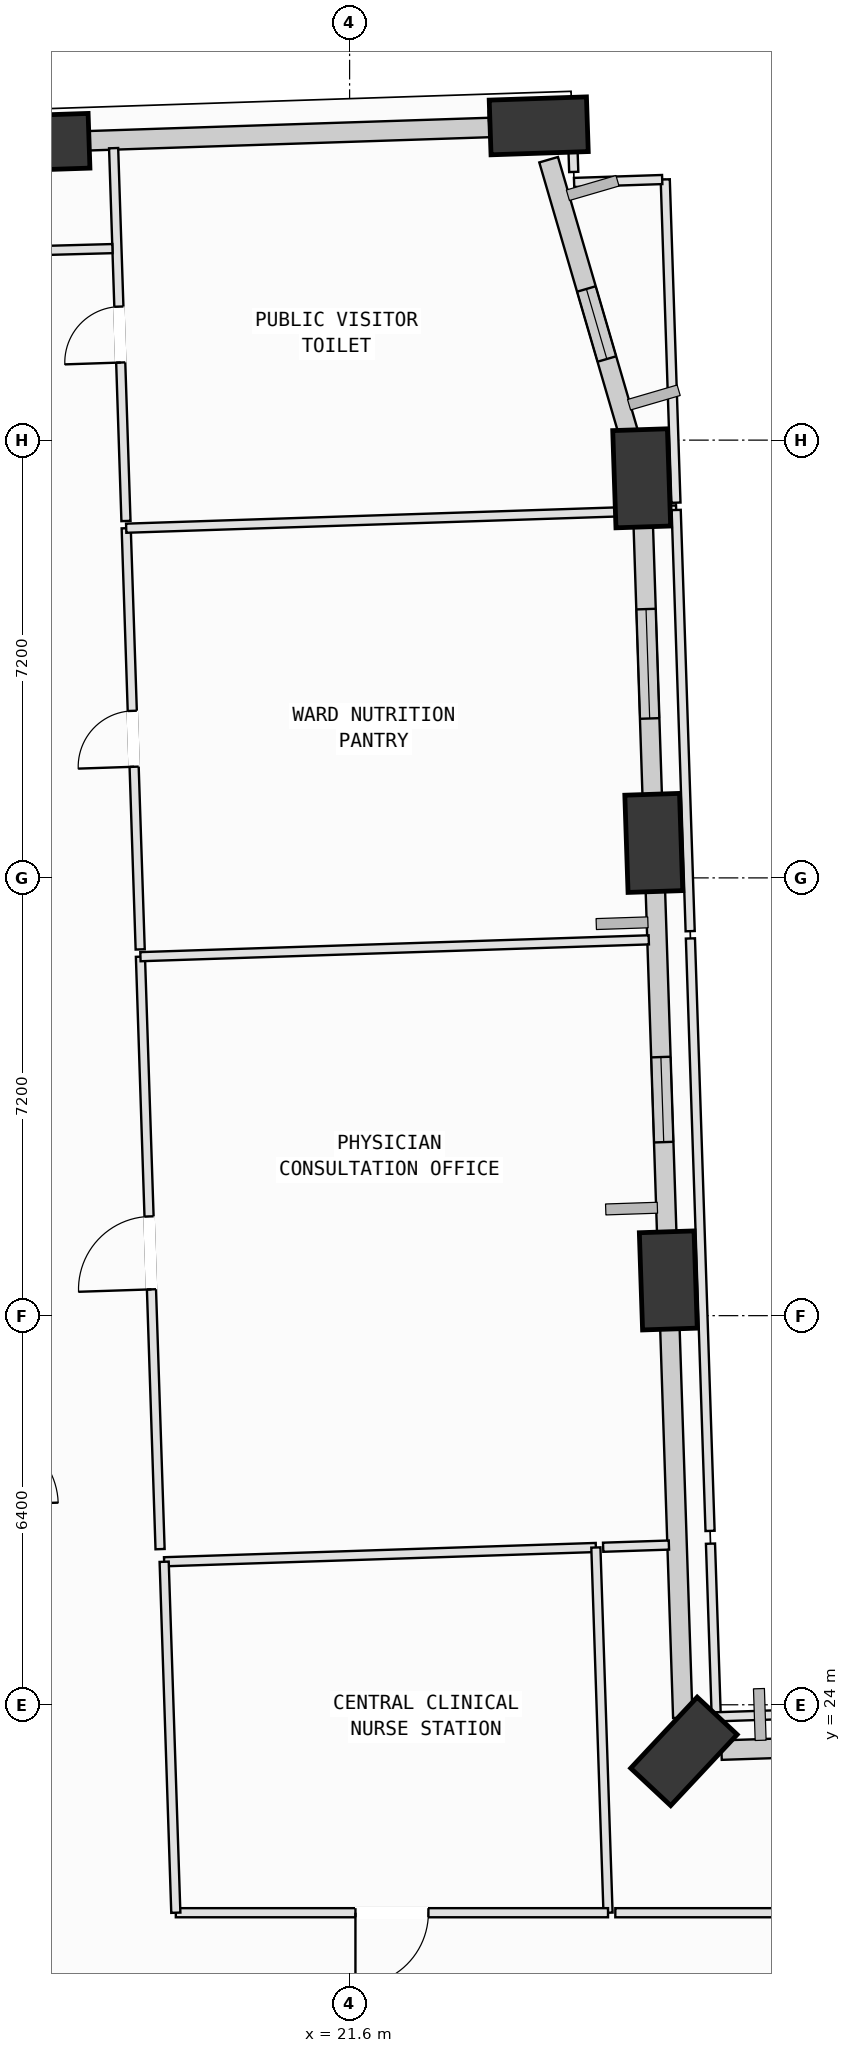
"""IFC4 building model, lengths in metres.
Left out: names, types, materials, properties, quantities, classifications, styles, units other than length and angle.
Written with IfcOpenShell. Run it as: python <this file> out.ifc"""

import sys

from ifc_helpers import new_model, si_unit, direction, frame, frame_2d, origin, origin_2d, place, context, subcontext, project, spatial, rectangle, extrude, element, fill, save


model = new_model("IFC4")
c1 = context("Model", 3, precision=1e-05, world=origin(), true_north=direction((0.0, 1.0)))
c2 = subcontext(c1, "Body", "Model", "MODEL_VIEW")
j1 = project(units=[si_unit("LENGTHUNIT", "METRE"), si_unit("PLANEANGLEUNIT", "RADIAN")], contexts=[c1])
p1 = place(None, origin())
s1 = spatial("IfcSite", under=j1, at=p1, CompositionType="ELEMENT")
p2 = place(p1, origin())
s2 = spatial("IfcBuilding", under=s1, at=p2, CompositionType="ELEMENT")
p3 = place(p2, frame((0.0, 0.0, 31.0)))
s3 = spatial("IfcBuildingStorey", under=s2, at=p3, CompositionType="ELEMENT", Elevation=31.0)
p4 = place(p3, frame((27.098, 23.234, 0.002), z_axis=(0.006717020494, -0.026929145799, 0.999614777173), x_axis=(0.486316991938, 0.873547428261, 0.020265091433)))
e1 = element("IfcColumn", 1, at=p4, inside=s3, PredefinedType="COLUMN", context=c2, shape_type="SweptSolid", body=[
    extrude(rectangle(XDim=1.6, YDim=0.9, at=origin_2d()), origin(), (0.0, 0.0, 1.0), 3.998),
])
p5 = place(p3, frame((26.841, 30.979, 0.002), z_axis=(-0.025333029356, -0.028202071234, 0.999281182051), x_axis=(0.642739954764, 0.765146921269, 0.037888513064)))
e2 = element("IfcColumn", 2, at=p5, inside=s3, PredefinedType="COLUMN", context=c2, shape_type="SweptSolid", body=[
    extrude(rectangle(XDim=1.6, YDim=0.9, at=origin_2d()), origin(), (0.0, 0.0, 1.0), 4.0),
])
p6 = place(p3, frame((26.603, 38.175, 0.002), z_axis=(-0.05505436103, -0.029386713196, 0.998050819557), x_axis=(0.864374485413, 0.498965398144, 0.062372112537)))
e3 = element("IfcColumn", 3, at=p6, inside=s3, PredefinedType="COLUMN", context=c2, shape_type="SweptSolid", body=[
    extrude(rectangle(XDim=1.6, YDim=0.9, at=origin_2d()), origin(), (0.0, 0.0, 1.0), 4.004),
])
p7 = place(p3, frame((26.404, 44.172, 0.002), z_axis=(-0.079732477798, -0.030432243434, 0.996351650043), x_axis=(0.918518556496, 0.386067712064, 0.085295856142)))
e4 = element("IfcColumn", 4, at=p7, inside=s3, PredefinedType="COLUMN", context=c2, shape_type="SweptSolid", body=[
    extrude(rectangle(XDim=1.6, YDim=0.9, at=origin_2d()), origin(), (0.0, 0.0, 1.0), 4.011),
])
p8 = place(p3, frame((24.71, 49.969, 0.002), z_axis=(-0.103400712653, -0.037462266416, 0.993934037659), x_axis=(0.371430623537, -0.928453550877, 0.00364633543)))
e5 = element("IfcColumn", 5, at=p8, inside=s3, PredefinedType="COLUMN", context=c2, shape_type="SweptSolid", body=[
    extrude(rectangle(XDim=1.6, YDim=0.9, at=origin_2d()), origin(), (0.0, 0.0, 1.0), 4.021),
])
p9 = place(p3, frame((16.515, 49.697, 0.002), z_axis=(-0.101772180039, -0.071101112082, 0.992263601686), x_axis=(0.59936256369, -0.800467097589, 0.004116178312)))
e6 = element("IfcColumn", 6, at=p9, inside=s3, PredefinedType="COLUMN", context=c2, shape_type="SweptSolid", body=[
    extrude(rectangle(XDim=1.6, YDim=0.9, at=origin_2d()), origin(), (0.0, 0.0, 1.0), 4.028),
])
p10 = place(p3, frame((27.715, 23.254, 0.0), z_axis=(0.0, 0.0, 1.0), x_axis=(0.999450231938, 0.033154696192, 0.0)))
e7 = element("IfcWall", 7, at=p10, inside=s3, PredefinedType="SOLIDWALL", context=c2, shape_type="SweptSolid", body=[
    extrude(rectangle(XDim=5.736, YDim=0.32, at=frame_2d((2.868, 0.0))), origin(), (0.0, 0.0, 1.0), 3.165),
])
p11 = place(p10, frame((1.957, 0.0, 0.75)))
e8 = element("IfcOpeningElement", 8, at=p11, cuts=e7, PredefinedType="OPENING", context=c2, shape_type="SweptSolid", body=[
    extrude(rectangle(XDim=1.6, YDim=1.95, at=frame_2d((0.8, 0.975))), frame((0.0, 0.17, 0.0), z_axis=(0.0, -1.0, 0.0), x_axis=(1.0, 0.0, 0.0)), (0.0, 0.0, 1.0), 0.34),
])
p12 = place(p3, frame((27.08, 23.787, 0.0), z_axis=(0.0, 0.0, 1.0), x_axis=(-0.033169315514, 0.999449746865, 0.0)))
e9 = element("IfcWall", 9, at=p12, inside=s3, PredefinedType="SOLIDWALL", context=c2, shape_type="SweptSolid", body=[
    extrude(rectangle(XDim=6.536, YDim=0.32, at=frame_2d((3.268, 0.0))), origin(), (0.0, 0.0, 1.0), 3.165),
])
p13 = place(p3, frame((26.823, 31.53, 0.0), z_axis=(0.0, 0.0, 1.0), x_axis=(-0.033139960349, 0.99945072066, 0.0)))
e10 = element("IfcWall", 10, at=p13, inside=s3, PredefinedType="SOLIDWALL", context=c2, shape_type="SweptSolid", body=[
    extrude(rectangle(XDim=5.997, YDim=0.32, at=frame_2d((2.998, 0.0))), origin(), (0.0, 0.0, 1.0), 3.165),
])
p14 = place(p13, frame((1.725, 0.0, 0.75)))
e11 = element("IfcOpeningElement", 11, at=p14, cuts=e10, PredefinedType="OPENING", context=c2, shape_type="SweptSolid", body=[
    extrude(rectangle(XDim=1.4, YDim=1.85, at=frame_2d((0.7, 0.925))), frame((0.0, 0.17, 0.0), z_axis=(0.0, -1.0, 0.0), x_axis=(1.0, 0.0, 0.0)), (0.0, 0.0, 1.0), 0.34),
])
p15 = place(p3, frame((26.585, 38.717, 0.0), z_axis=(0.0, 0.0, 1.0), x_axis=(-0.033151114743, 0.999450350739, 0.0)))
e12 = element("IfcWall", 12, at=p15, inside=s3, PredefinedType="SOLIDWALL", context=c2, shape_type="SweptSolid", body=[
    extrude(rectangle(XDim=4.816, YDim=0.32, at=frame_2d((2.408, 0.0))), origin(), (0.0, 0.0, 1.0), 3.165),
])
p16 = place(p15, frame((1.506, 0.0, 0.75)))
e13 = element("IfcOpeningElement", 13, at=p16, cuts=e12, PredefinedType="OPENING", context=c2, shape_type="SweptSolid", body=[
    extrude(rectangle(XDim=1.8, YDim=2.05, at=frame_2d((0.9, 1.025))), frame((0.0, 0.17, 0.0), z_axis=(0.0, -1.0, 0.0), x_axis=(1.0, 0.0, 0.0)), (0.0, 0.0, 1.0), 0.34),
])
p17 = place(p3, frame((24.873, 49.412, 0.0), z_axis=(0.0, 0.0, 1.0), x_axis=(0.280335546641, -0.959902068593, 0.0)))
e14 = element("IfcWall", 14, at=p17, inside=s3, PredefinedType="SOLIDWALL", context=c2, shape_type="SweptSolid", body=[
    extrude(rectangle(XDim=4.889, YDim=0.32, at=frame_2d((2.445, 0.0))), origin(), (0.0, 0.0, 1.0), 3.165),
])
p18 = place(p17, frame((2.215, 0.0, 0.75)))
e15 = element("IfcOpeningElement", 15, at=p18, cuts=e14, PredefinedType="OPENING", context=c2, shape_type="SweptSolid", body=[
    extrude(rectangle(XDim=1.2, YDim=1.75, at=frame_2d((0.6, 0.875))), frame((0.0, 0.17, 0.0), z_axis=(0.0, -1.0, 0.0), x_axis=(1.0, 0.0, 0.0)), (0.0, 0.0, 1.0), 0.34),
])
p19 = place(p3, frame((16.897, 49.71, 0.0), z_axis=(0.0, 0.0, 1.0), x_axis=(0.999450233856, 0.033154638356, 0.0)))
e16 = element("IfcWall", 16, at=p19, inside=s3, PredefinedType="SOLIDWALL", context=c2, shape_type="SweptSolid", body=[
    extrude(rectangle(XDim=7.003, YDim=0.32, at=frame_2d((3.501, 0.0))), origin(), (0.0, 0.0, 1.0), 3.165),
])
p20 = place(p3, frame((18.55, 26.352, 0.0), z_axis=(0.0, 0.0, 1.0), x_axis=(0.999453304849, 0.033061933196, 0.0)))
e17 = element("IfcWall", 17, at=p20, inside=s3, PredefinedType="PARTITIONING", context=c2, shape_type="SweptSolid", body=[
    extrude(rectangle(XDim=7.104, YDim=0.15, at=frame_2d((3.552, 0.0))), origin(), (0.0, 0.0, 1.0), 3.78),
])
p21 = place(p3, frame((25.65, 26.587, 0.0), z_axis=(0.0, 0.0, 1.0), x_axis=(0.033309420078, -0.999445087303, 0.0)))
e18 = element("IfcWall", 18, at=p21, inside=s3, PredefinedType="PARTITIONING", context=c2, shape_type="SweptSolid", body=[
    extrude(rectangle(XDim=6.01, YDim=0.15, at=frame_2d((3.005, 0.0))), origin(), (0.0, 0.0, 1.0), 3.78),
])
p22 = place(p3, frame((25.85, 20.58, 0.0), z_axis=(0.0, 0.0, 1.0), x_axis=(-1.0, 0.0, 0.0)))
e19 = element("IfcWall", 19, at=p22, inside=s3, PredefinedType="PARTITIONING", context=c2, shape_type="SweptSolid", body=[
    extrude(rectangle(XDim=7.108, YDim=0.15, at=frame_2d((3.554, 0.0))), origin(), (0.0, 0.0, 1.0), 3.78),
])
p23 = place(p22, frame((2.954, 0.0, 0.0)))
e20 = element("IfcOpeningElement", 20, at=p23, cuts=e19, PredefinedType="OPENING", context=c2, shape_type="SweptSolid", body=[
    extrude(rectangle(XDim=1.2, YDim=2.15, at=frame_2d((0.6, 1.075))), frame((0.0, 0.085, 0.0), z_axis=(0.0, -1.0, 0.0), x_axis=(1.0, 0.0, 0.0)), (0.0, 0.0, 1.0), 0.17),
])
p24 = place(p3, frame((18.742, 20.58, 0.0), z_axis=(0.0, 0.0, 1.0), x_axis=(-0.033227560289, 0.999447812163, 0.0)))
e21 = element("IfcWall", 21, at=p24, inside=s3, PredefinedType="PARTITIONING", context=c2, shape_type="SweptSolid", body=[
    extrude(rectangle(XDim=5.775, YDim=0.15, at=frame_2d((2.888, 0.0))), origin(), (0.0, 0.0, 1.0), 3.78),
])
p25 = place(p3, frame((25.77, 26.591, 0.0), z_axis=(0.0, 0.0, 1.0), x_axis=(0.999449407039, 0.033179553486, 0.0)))
e22 = element("IfcWall", 22, at=p25, inside=s3, PredefinedType="PARTITIONING", context=c2, shape_type="SweptSolid", body=[
    extrude(rectangle(XDim=1.082, YDim=0.15, at=frame_2d((0.541, 0.0))), origin(), (0.0, 0.0, 1.0), 3.78),
])
p26 = place(p3, frame((27.535, 26.65, 0.0), z_axis=(0.0, 0.0, 1.0), x_axis=(0.033329094198, -0.999444431412, 0.0)))
e23 = element("IfcWall", 23, at=p26, inside=s3, PredefinedType="PARTITIONING", context=c2, shape_type="SweptSolid", body=[
    extrude(rectangle(XDim=2.849, YDim=0.15, at=frame_2d((1.425, 0.0))), origin(), (0.0, 0.0, 1.0), 3.78),
])
p27 = place(p3, frame((27.63, 23.802, 0.0), z_axis=(0.0, 0.0, 1.0), x_axis=(0.999456083322, 0.032977833635, 0.0)))
e24 = element("IfcWall", 24, at=p27, inside=s3, PredefinedType="PARTITIONING", context=c2, shape_type="SweptSolid", body=[
    extrude(rectangle(XDim=5.789, YDim=0.15, at=frame_2d((2.895, 0.0))), origin(), (0.0, 0.0, 1.0), 3.78),
])
p28 = place(p3, frame((33.529, 20.58, 0.0), z_axis=(0.0, 0.0, 1.0), x_axis=(-1.0, 0.0, 0.0)))
e25 = element("IfcWall", 25, at=p28, inside=s3, PredefinedType="PARTITIONING", context=c2, shape_type="SweptSolid", body=[
    extrude(rectangle(XDim=7.559, YDim=0.15, at=frame_2d((3.78, 0.0))), origin(), (0.0, 0.0, 1.0), 3.78),
])
p29 = place(p28, frame((3.179, 0.0, 0.0)))
e26 = element("IfcOpeningElement", 26, at=p29, cuts=e25, PredefinedType="OPENING", context=c2, shape_type="SweptSolid", body=[
    extrude(rectangle(XDim=1.2, YDim=2.15, at=frame_2d((0.6, 1.075))), frame((0.0, 0.085, 0.0), z_axis=(0.0, -1.0, 0.0), x_axis=(1.0, 0.0, 0.0)), (0.0, 0.0, 1.0), 0.17),
])
p30 = place(p3, frame((18.483, 26.56, 0.0), z_axis=(0.0, 0.0, 1.0), x_axis=(-0.033130558388, 0.999451032368, 0.0)))
e27 = element("IfcWall", 27, at=p30, inside=s3, PredefinedType="PARTITIONING", context=c2, shape_type="SweptSolid", body=[
    extrude(rectangle(XDim=9.749, YDim=0.15, at=frame_2d((4.875, 0.0))), origin(), (0.0, 0.0, 1.0), 3.78),
])
p31 = place(p30, frame((4.275, 0.0, 0.0)))
e28 = element("IfcOpeningElement", 28, at=p31, cuts=e27, PredefinedType="OPENING", context=c2, shape_type="SweptSolid", body=[
    extrude(rectangle(XDim=1.2, YDim=2.15, at=frame_2d((0.6, 1.075))), frame((0.0, 0.085, 0.0), z_axis=(0.0, -1.0, 0.0), x_axis=(1.0, 0.0, 0.0)), (0.0, 0.0, 1.0), 0.17),
])
p32 = place(p3, frame((18.16, 36.304, 0.0), z_axis=(0.0, 0.0, 1.0), x_axis=(0.999451141427, 0.033127268216, 0.0)))
e29 = element("IfcWall", 29, at=p32, inside=s3, PredefinedType="PARTITIONING", context=c2, shape_type="SweptSolid", body=[
    extrude(rectangle(XDim=8.365, YDim=0.15, at=frame_2d((4.182, 0.0))), origin(), (0.0, 0.0, 1.0), 3.78),
])
p33 = place(p3, frame((27.205, 36.604, 0.0), z_axis=(0.0, 0.0, 1.0), x_axis=(0.033130558388, -0.999451032368, 0.0)))
e30 = element("IfcWall", 30, at=p33, inside=s3, PredefinedType="PARTITIONING", context=c2, shape_type="SweptSolid", body=[
    extrude(rectangle(XDim=9.749, YDim=0.15, at=frame_2d((4.875, 0.0))), origin(), (0.0, 0.0, 1.0), 3.78),
])
p34 = place(p3, frame((18.156, 36.424, 0.0), z_axis=(0.0, 0.0, 1.0), x_axis=(-0.033182294988, 0.999449316023, 0.0)))
e31 = element("IfcWall", 31, at=p34, inside=s3, PredefinedType="PARTITIONING", context=c2, shape_type="SweptSolid", body=[
    extrude(rectangle(XDim=6.931, YDim=0.15, at=frame_2d((3.465, 0.0))), origin(), (0.0, 0.0, 1.0), 3.78),
])
p35 = place(p34, frame((3.005, 0.0, 0.0)))
e32 = element("IfcOpeningElement", 32, at=p35, cuts=e31, PredefinedType="OPENING", context=c2, shape_type="SweptSolid", body=[
    extrude(rectangle(XDim=0.92, YDim=2.1, at=frame_2d((0.46, 1.05))), frame((0.0, 0.085, 0.0), z_axis=(0.0, -1.0, 0.0), x_axis=(1.0, 0.0, 0.0)), (0.0, 0.0, 1.0), 0.17),
])
p36 = place(p3, frame((17.926, 43.351, 0.0), z_axis=(0.0, 0.0, 1.0), x_axis=(0.999450530014, 0.033145709461, 0.0)))
e33 = element("IfcWall", 33, at=p36, inside=s3, PredefinedType="PARTITIONING", context=c2, shape_type="SweptSolid", body=[
    extrude(rectangle(XDim=8.412, YDim=0.15, at=frame_2d((4.206, 0.0))), origin(), (0.0, 0.0, 1.0), 3.78),
])
p37 = place(p3, frame((26.51, 43.636, 0.0), z_axis=(0.0, 0.0, 1.0), x_axis=(0.999478462141, 0.032292471499, 0.0)))
e34 = element("IfcWall", 34, at=p37, inside=s3, PredefinedType="PARTITIONING", context=c2, shape_type="SweptSolid", body=[
    extrude(rectangle(XDim=0.461, YDim=0.15, at=frame_2d((0.23, 0.0))), origin(), (0.0, 0.0, 1.0), 3.78),
])
p38 = place(p3, frame((26.971, 43.651, 0.0), z_axis=(0.0, 0.0, 1.0), x_axis=(0.033183463244, -0.999449277236, 0.0)))
e35 = element("IfcWall", 35, at=p38, inside=s3, PredefinedType="PARTITIONING", context=c2, shape_type="SweptSolid", body=[
    extrude(rectangle(XDim=6.931, YDim=0.15, at=frame_2d((3.465, 0.0))), origin(), (0.0, 0.0, 1.0), 3.78),
])
p39 = place(p3, frame((26.791, 49.088, 0.0), z_axis=(0.0, 0.0, 1.0), x_axis=(0.033088676403, -0.999452419825, 0.0)))
e36 = element("IfcWall", 36, at=p39, inside=s3, PredefinedType="PARTITIONING", context=c2, shape_type="SweptSolid", body=[
    extrude(rectangle(XDim=5.32, YDim=0.15, at=frame_2d((2.66, 0.0))), origin(), (0.0, 0.0, 1.0), 3.78),
])
p40 = place(p3, frame((17.922, 43.47, 0.0), z_axis=(0.0, 0.0, 1.0), x_axis=(-0.033106816638, 0.999451819095, 0.0)))
e37 = element("IfcWall", 37, at=p40, inside=s3, PredefinedType="PARTITIONING", context=c2, shape_type="SweptSolid", body=[
    extrude(rectangle(XDim=6.135, YDim=0.15, at=frame_2d((3.068, 0.0))), origin(), (0.0, 0.0, 1.0), 3.78),
])
p41 = place(p40, frame((2.608, 0.0, 0.0)))
e38 = element("IfcOpeningElement", 38, at=p41, cuts=e37, PredefinedType="OPENING", context=c2, shape_type="SweptSolid", body=[
    extrude(rectangle(XDim=0.92, YDim=2.1, at=frame_2d((0.46, 1.05))), frame((0.0, 0.085, 0.0), z_axis=(0.0, -1.0, 0.0), x_axis=(1.0, 0.0, 0.0)), (0.0, 0.0, 1.0), 0.17),
])
p42 = place(p3, frame((23.89, 50.132, 0.0), z_axis=(0.0, 0.0, 1.0), x_axis=(0.999458129886, 0.032915750116, 0.0)))
e39 = element("IfcWall", 39, at=p42, inside=s3, PredefinedType="PARTITIONING", context=c2, shape_type="SweptSolid", body=[
    extrude(rectangle(XDim=1.365, YDim=0.15, at=frame_2d((0.682, 0.0))), origin(), (0.0, 0.0, 1.0), 3.165),
])
p43 = place(p3, frame((25.256, 50.127, 0.0), z_axis=(0.0, 0.0, 1.0), x_axis=(0.032498815678, -0.999471773978, 0.0)))
e40 = element("IfcWall", 40, at=p43, inside=s3, PredefinedType="PARTITIONING", context=c2, shape_type="SweptSolid", body=[
    extrude(rectangle(XDim=0.917, YDim=0.15, at=frame_2d((0.458, 0.0))), origin(), (0.0, 0.0, 1.0), 3.78),
])
p44 = place(p3, frame((25.292, 49.038, 0.0), z_axis=(0.0, 0.0, 1.0), x_axis=(0.999455139101, 0.033006437618, 0.0)))
e41 = element("IfcWall", 41, at=p44, inside=s3, PredefinedType="PARTITIONING", context=c2, shape_type="SweptSolid", body=[
    extrude(rectangle(XDim=1.45, YDim=0.15, at=frame_2d((0.725, 0.0))), origin(), (0.0, 0.0, 1.0), 3.78),
])
p45 = place(p3, frame((17.7, 47.95, 0.0), z_axis=(0.0, 0.0, 1.0), x_axis=(-0.999627876936, -0.027278336698, 0.0)))
e42 = element("IfcWall", 42, at=p45, inside=s3, PredefinedType="PARTITIONING", context=c2, shape_type="SweptSolid", body=[
    extrude(rectangle(XDim=2.676, YDim=0.15, at=frame_2d((1.338, 0.0))), origin(), (0.0, 0.0, 1.0), 3.78),
])
p46 = place(p14, origin())
e43 = element("IfcWindow", 43, at=p46, inside=s3, PartitioningType="SINGLE_PANEL", PredefinedType="WINDOW", context=c2, shape_type="SweptSolid", body=[
    extrude(rectangle(XDim=1.4, YDim=1.85, at=frame_2d((0.7, 0.925))), frame((0.0, 0.03, 0.0), z_axis=(0.0, -1.0, 0.0), x_axis=(1.0, 0.0, 0.0)), (0.0, 0.0, 1.0), 0.06),
])
fill(e11, e43)
p47 = place(p16, origin())
e44 = element("IfcWindow", 44, at=p47, inside=s3, PartitioningType="SINGLE_PANEL", PredefinedType="WINDOW", context=c2, shape_type="SweptSolid", body=[
    extrude(rectangle(XDim=1.8, YDim=2.05, at=frame_2d((0.9, 1.025))), frame((0.0, 0.03, 0.0), z_axis=(0.0, -1.0, 0.0), x_axis=(1.0, 0.0, 0.0)), (0.0, 0.0, 1.0), 0.06),
])
fill(e13, e44)
p48 = place(p18, origin())
e45 = element("IfcWindow", 45, at=p48, inside=s3, PartitioningType="SINGLE_PANEL", PredefinedType="WINDOW", context=c2, shape_type="SweptSolid", body=[
    extrude(rectangle(XDim=1.2, YDim=1.75, at=frame_2d((0.6, 0.875))), frame((0.0, 0.03, 0.0), z_axis=(0.0, -1.0, 0.0), x_axis=(1.0, 0.0, 0.0)), (0.0, 0.0, 1.0), 0.06),
])
fill(e15, e45)
p49 = place(p23, origin())
e46 = element("IfcDoor", 46, at=p49, inside=s3, OperationType="SINGLE_SWING_RIGHT", PredefinedType="DOOR", context=c2, shape_type="SweptSolid", body=[
    extrude(rectangle(XDim=1.2, YDim=2.15, at=frame_2d((0.6, 1.075))), frame((0.0, 0.025, 0.0), z_axis=(0.0, -1.0, 0.0), x_axis=(1.0, 0.0, 0.0)), (0.0, 0.0, 1.0), 0.05),
])
fill(e20, e46)
p50 = place(p31, origin())
e47 = element("IfcDoor", 47, at=p50, inside=s3, OperationType="SINGLE_SWING_LEFT", PredefinedType="DOOR", context=c2, shape_type="SweptSolid", body=[
    extrude(rectangle(XDim=1.2, YDim=2.15, at=frame_2d((0.6, 1.075))), frame((0.0, 0.025, 0.0), z_axis=(0.0, -1.0, 0.0), x_axis=(1.0, 0.0, 0.0)), (0.0, 0.0, 1.0), 0.05),
])
fill(e28, e47)
p51 = place(p35, origin())
e48 = element("IfcDoor", 48, at=p51, inside=s3, OperationType="SINGLE_SWING_LEFT", PredefinedType="DOOR", context=c2, shape_type="SweptSolid", body=[
    extrude(rectangle(XDim=0.92, YDim=2.1, at=frame_2d((0.46, 1.05))), frame((0.0, 0.025, 0.0), z_axis=(0.0, -1.0, 0.0), x_axis=(1.0, 0.0, 0.0)), (0.0, 0.0, 1.0), 0.05),
])
fill(e32, e48)
p52 = place(p41, origin())
e49 = element("IfcDoor", 49, at=p52, inside=s3, OperationType="SINGLE_SWING_LEFT", PredefinedType="DOOR", context=c2, shape_type="SweptSolid", body=[
    extrude(rectangle(XDim=0.92, YDim=2.1, at=frame_2d((0.46, 1.05))), frame((0.0, 0.025, 0.0), z_axis=(0.0, -1.0, 0.0), x_axis=(1.0, 0.0, 0.0)), (0.0, 0.0, 1.0), 0.05),
])
fill(e38, e49)
save(model, sys.argv[1])
